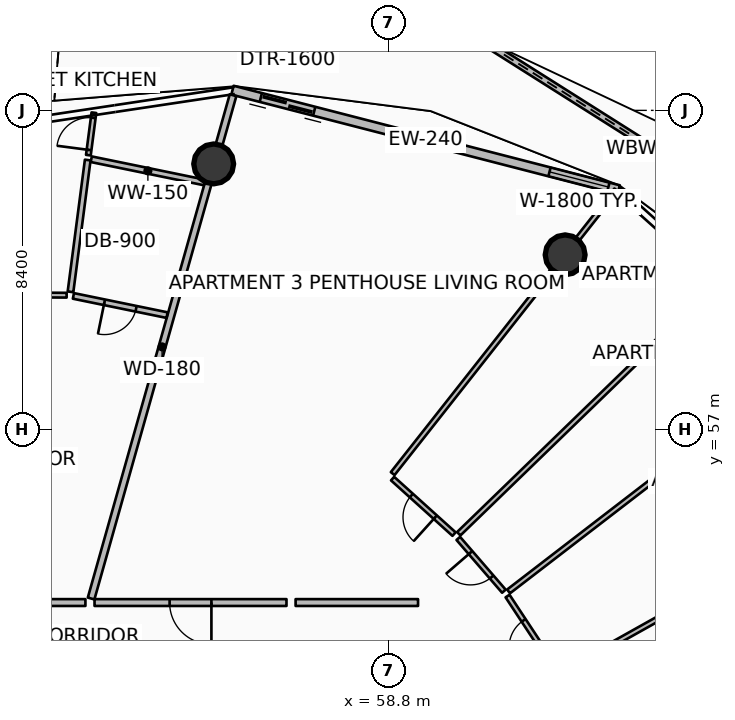
"""IFC4 building model, lengths in metres.
Left out: names, types, materials, properties, quantities, classifications, styles, units other than length and angle.
Written with IfcOpenShell. Run it as: python <this file> out.ifc"""

import sys

from ifc_helpers import new_model, si_unit, direction, frame, frame_2d, origin, origin_2d, place, context, subcontext, project, spatial, polyline, rectangle, circle, outline, extrude, element, fill, save


model = new_model("IFC4")
c1 = context("Model", 3, precision=1e-05, world=origin(), true_north=direction((0.0, 1.0)))
c2 = subcontext(c1, "Body", "Model", "MODEL_VIEW")
j1 = project(units=[si_unit("LENGTHUNIT", "METRE"), si_unit("PLANEANGLEUNIT", "RADIAN")], contexts=[c1])
p1 = place(None, origin())
s1 = spatial("IfcSite", under=j1, at=p1, CompositionType="ELEMENT")
p2 = place(p1, origin())
s2 = spatial("IfcBuilding", under=s1, at=p2, CompositionType="ELEMENT")
p3 = place(p2, frame((0.0, 0.0, 187.8)))
s3 = spatial("IfcBuildingStorey", under=s2, at=p3, CompositionType="ELEMENT", Elevation=187.8)
for number, where, z_axis, x_axis in (
    (1, (63.451, 61.599, 0.0), (0.0, 0.0, 1.0), (1.0, 0.0, 0.0)),
    (2, (54.202, 63.992, 0.0), (0.0, 0.0, 1.0), (1.0, 0.0, 0.0)),
):
    element("IfcColumn", number, at=place(p3, frame(where, z_axis=z_axis, x_axis=x_axis)), inside=s3, PredefinedType="COLUMN", context=c2, shape_type="SweptSolid", body=[
        extrude(circle(Radius=0.525, at=origin_2d()), origin(), (0.0, 0.0, 1.0), 3.5),
    ])
p4 = place(p3, frame((70.46, 61.421, 0.0), z_axis=(0.0, 0.0, 1.0), x_axis=(-0.845278126761, 0.53432657469, 0.0)))
e3 = element("IfcWall", 3, at=p4, inside=s3, PredefinedType="PARAPET", context=c2, shape_type="SweptSolid", body=[
    extrude(outline(polyline([(0.0, 0.0), (11.123, 0.0), (11.123, 1.632), (5.562, 1.418), (0.0, 1.233), (0.0, 0.0)])), frame((0.0, 0.09, 0.0), z_axis=(0.0, -1.0, 0.0), x_axis=(1.0, 0.0, 0.0)), (0.0, 0.0, 1.0), 0.18),
])
p5 = place(p3, frame((64.86, 63.313, 0.0), z_axis=(0.0, 0.0, 1.0), x_axis=(-0.968374028006, 0.249502989727, 0.0)))
e4 = element("IfcWall", 4, at=p5, inside=s3, PredefinedType="SOLIDWALL", context=c2, shape_type="SweptSolid", body=[
    extrude(rectangle(XDim=10.494, YDim=0.24, at=frame_2d((5.247, 0.0))), origin(), (0.0, 0.0, 1.0), 2.45),
])
p6 = place(p5, frame((8.274, 0.0, 0.0)))
e5 = element("IfcOpeningElement", 5, at=p6, cuts=e4, PredefinedType="OPENING", context=c2, shape_type="SweptSolid", body=[
    extrude(rectangle(XDim=1.45, YDim=2.15, at=frame_2d((0.725, 1.075))), frame((0.0, 0.13, 0.0), z_axis=(0.0, -1.0, 0.0), x_axis=(1.0, 0.0, 0.0)), (0.0, 0.0, 1.0), 0.26),
])
p7 = place(p5, frame((0.28, 0.0, 0.65)))
e6 = element("IfcOpeningElement", 6, at=p7, cuts=e4, PredefinedType="OPENING", context=c2, shape_type="SweptSolid", body=[
    extrude(rectangle(XDim=1.6, YDim=1.5, at=frame_2d((0.8, 0.75))), frame((0.0, 0.13, 0.0), z_axis=(0.0, -1.0, 0.0), x_axis=(1.0, 0.0, 0.0)), (0.0, 0.0, 1.0), 0.26),
])
p8 = place(p3, frame((50.977, 52.556, 0.0), z_axis=(0.0, 0.0, 1.0), x_axis=(0.271443307373, 0.962454430548, 0.0)))
e7 = element("IfcWall", 7, at=p8, inside=s3, PredefinedType="PARTITIONING", context=c2, shape_type="SweptSolid", body=[
    extrude(rectangle(XDim=13.759, YDim=0.18, at=frame_2d((6.88, 0.0))), origin(), (0.0, 0.0, 1.0), 2.94),
])
p9 = place(p3, frame((50.827, 52.45, 0.0), z_axis=(0.0, 0.0, 1.0), x_axis=(-1.0, 0.0, 0.0)))
e8 = element("IfcWall", 8, at=p9, inside=s3, PredefinedType="PARTITIONING", context=c2, shape_type="SweptSolid", body=[
    extrude(rectangle(XDim=3.944, YDim=0.18, at=frame_2d((1.972, 0.0))), origin(), (0.0, 0.0, 1.0), 2.94),
])
p10 = place(p3, frame((52.976, 60.012, 0.0), z_axis=(0.0, 0.0, 1.0), x_axis=(-0.979567919456, 0.201113627516, 0.0)))
e9 = element("IfcWall", 9, at=p10, inside=s3, PredefinedType="PARTITIONING", context=c2, shape_type="SweptSolid", body=[
    extrude(rectangle(XDim=2.517, YDim=0.15, at=frame_2d((1.258, 0.0))), origin(), (0.0, 0.0, 1.0), 2.94),
])
p11 = place(p10, frame((0.833, 0.0, 0.0)))
e10 = element("IfcOpeningElement", 10, at=p11, cuts=e9, PredefinedType="OPENING", context=c2, shape_type="SweptSolid", body=[
    extrude(rectangle(XDim=0.85, YDim=2.06, at=frame_2d((0.425, 1.03))), frame((0.0, 0.085, 0.0), z_axis=(0.0, -1.0, 0.0), x_axis=(1.0, 0.0, 0.0)), (0.0, 0.0, 1.0), 0.17),
])
p12 = place(p3, frame((53.961, 63.503, 0.0), z_axis=(0.0, 0.0, 1.0), x_axis=(-0.979589733131, 0.201007349976, 0.0)))
e11 = element("IfcWall", 11, at=p12, inside=s3, PredefinedType="PARTITIONING", context=c2, shape_type="SweptSolid", body=[
    extrude(rectangle(XDim=3.041, YDim=0.15, at=frame_2d((1.521, 0.0))), origin(), (0.0, 0.0, 1.0), 2.94),
])
p13 = place(p3, frame((50.435, 60.625, 0.0), z_axis=(0.0, 0.0, 1.0), x_axis=(0.129574965198, 0.991569628616, 0.0)))
e12 = element("IfcWall", 12, at=p13, inside=s3, PredefinedType="PARTITIONING", context=c2, shape_type="SweptSolid", body=[
    extrude(rectangle(XDim=3.497, YDim=0.15, at=frame_2d((1.749, 0.0))), origin(), (0.0, 0.0, 1.0), 2.94),
])
p14 = place(p3, frame((50.905, 64.222, 0.0), z_axis=(0.0, 0.0, 1.0), x_axis=(0.129607883109, 0.991565326459, 0.0)))
e13 = element("IfcWall", 13, at=p14, inside=s3, PredefinedType="PARTITIONING", context=c2, shape_type="SweptSolid", body=[
    extrude(rectangle(XDim=1.126, YDim=0.125, at=frame_2d((0.563, 0.0))), origin(), (0.0, 0.0, 1.0), 2.94),
])
p15 = place(p14, frame((0.138, 0.0, 0.0)))
e14 = element("IfcOpeningElement", 14, at=p15, cuts=e13, PredefinedType="OPENING", context=c2, shape_type="SweptSolid", body=[
    extrude(rectangle(XDim=0.85, YDim=2.06, at=frame_2d((0.425, 1.03))), frame((0.0, 0.073, 0.0), z_axis=(0.0, -1.0, 0.0), x_axis=(1.0, 0.0, 0.0)), (0.0, 0.0, 1.0), 0.145),
])
p16 = place(p3, frame((50.333, 60.537, 0.0), z_axis=(0.0, 0.0, 1.0), x_axis=(-0.999981626936, 0.006061830649, 0.0)))
e15 = element("IfcWall", 15, at=p16, inside=s3, PredefinedType="PARTITIONING", context=c2, shape_type="SweptSolid", body=[
    extrude(rectangle(XDim=4.43, YDim=0.125, at=frame_2d((2.215, 0.0))), origin(), (0.0, 0.0, 1.0), 2.94),
])
p17 = place(p16, frame((1.765, 0.0, 0.0)))
e16 = element("IfcOpeningElement", 16, at=p17, cuts=e15, PredefinedType="OPENING", context=c2, shape_type="SweptSolid", body=[
    extrude(rectangle(XDim=0.9, YDim=2.08, at=frame_2d((0.45, 1.04))), frame((0.0, 0.073, 0.0), z_axis=(0.0, -1.0, 0.0), x_axis=(1.0, 0.0, 0.0)), (0.0, 0.0, 1.0), 0.145),
])
p18 = place(p3, frame((56.118, 52.45, 0.0), z_axis=(0.0, 0.0, 1.0), x_axis=(-1.0, 0.0, 0.0)))
e17 = element("IfcWall", 17, at=p18, inside=s3, PredefinedType="PARTITIONING", context=c2, shape_type="SweptSolid", body=[
    extrude(rectangle(XDim=5.051, YDim=0.18, at=frame_2d((2.525, 0.0))), origin(), (0.0, 0.0, 1.0), 2.94),
])
p19 = place(p18, frame((1.975, 0.0, 0.0)))
e18 = element("IfcOpeningElement", 18, at=p19, cuts=e17, PredefinedType="OPENING", context=c2, shape_type="SweptSolid", body=[
    extrude(rectangle(XDim=1.1, YDim=2.1, at=frame_2d((0.55, 1.05))), frame((0.0, 0.1, 0.0), z_axis=(0.0, -1.0, 0.0), x_axis=(1.0, 0.0, 0.0)), (0.0, 0.0, 1.0), 0.2),
])
p20 = place(p3, frame((64.43, 48.356, 0.0), z_axis=(0.0, 0.0, 1.0), x_axis=(0.932640168577, 0.360807865709, 0.0)))
e19 = element("IfcWall", 19, at=p20, inside=s3, PredefinedType="PARTITIONING", context=c2, shape_type="SweptSolid", body=[
    extrude(rectangle(XDim=9.783, YDim=0.125, at=frame_2d((4.892, 0.0))), origin(), (0.0, 0.0, 1.0), 2.94),
])
p21 = place(p3, frame((59.58, 52.45, 0.0), z_axis=(0.0, 0.0, 1.0), x_axis=(-1.0, 0.0, 0.0)))
e20 = element("IfcWall", 20, at=p21, inside=s3, PredefinedType="PARTITIONING", context=c2, shape_type="SweptSolid", body=[
    extrude(rectangle(XDim=3.222, YDim=0.18, at=frame_2d((1.611, 0.0))), origin(), (0.0, 0.0, 1.0), 2.94),
])
p22 = place(p3, frame((63.379, 50.613, 0.0), z_axis=(0.0, 0.0, 1.0), x_axis=(0.872503583261, 0.488607712994, 0.0)))
e21 = element("IfcWall", 21, at=p22, inside=s3, PredefinedType="PARTITIONING", context=c2, shape_type="SweptSolid", body=[
    extrude(rectangle(XDim=10.268, YDim=0.125, at=frame_2d((5.134, 0.0))), origin(), (0.0, 0.0, 1.0), 2.94),
])
p23 = place(p3, frame((58.913, 55.843, 0.0), z_axis=(0.0, 0.0, 1.0), x_axis=(0.619083548323, 0.785325130246, 0.0)))
e22 = element("IfcWall", 22, at=p23, inside=s3, PredefinedType="PARTITIONING", context=c2, shape_type="SweptSolid", body=[
    extrude(rectangle(XDim=9.503, YDim=0.125, at=frame_2d((4.751, 0.0))), origin(), (0.0, 0.0, 1.0), 2.94),
])
p24 = place(p3, frame((61.962, 52.743, 0.0), z_axis=(0.0, 0.0, 1.0), x_axis=(0.792560870927, 0.609792805693, 0.0)))
e23 = element("IfcWall", 23, at=p24, inside=s3, PredefinedType="PARTITIONING", context=c2, shape_type="SweptSolid", body=[
    extrude(rectangle(XDim=9.922, YDim=0.125, at=frame_2d((4.961, 0.0))), origin(), (0.0, 0.0, 1.0), 2.94),
])
p25 = place(p3, frame((60.651, 54.26, 0.0), z_axis=(0.0, 0.0, 1.0), x_axis=(0.718131329051, 0.695907604669, 0.0)))
e24 = element("IfcWall", 24, at=p25, inside=s3, PredefinedType="PARTITIONING", context=c2, shape_type="SweptSolid", body=[
    extrude(rectangle(XDim=9.524, YDim=0.125, at=frame_2d((4.762, 0.0))), origin(), (0.0, 0.0, 1.0), 2.94),
])
p26 = place(p3, frame((63.248, 50.631, 0.0), z_axis=(0.0, 0.0, 1.0), x_axis=(-0.550605373428, 0.834765669366, 0.0)))
e25 = element("IfcWall", 25, at=p26, inside=s3, PredefinedType="PARTITIONING", context=c2, shape_type="SweptSolid", body=[
    extrude(rectangle(XDim=2.384, YDim=0.125, at=frame_2d((1.192, 0.0))), origin(), (0.0, 0.0, 1.0), 2.94),
])
p27 = place(p26, frame((0.767, 0.0, 0.0)))
e26 = element("IfcOpeningElement", 26, at=p27, cuts=e25, PredefinedType="OPENING", context=c2, shape_type="SweptSolid", body=[
    extrude(rectangle(XDim=0.85, YDim=2.06, at=frame_2d((0.425, 1.03))), frame((0.0, 0.073, 0.0), z_axis=(0.0, -1.0, 0.0), x_axis=(1.0, 0.0, 0.0)), (0.0, 0.0, 1.0), 0.145),
])
p28 = place(p3, frame((61.839, 52.749, 0.0), z_axis=(0.0, 0.0, 1.0), x_axis=(-0.653952359422, 0.756535730555, 0.0)))
e27 = element("IfcWall", 27, at=p28, inside=s3, PredefinedType="PARTITIONING", context=c2, shape_type="SweptSolid", body=[
    extrude(rectangle(XDim=1.835, YDim=0.125, at=frame_2d((0.917, 0.0))), origin(), (0.0, 0.0, 1.0), 2.94),
])
p29 = place(p28, frame((0.492, 0.0, 0.0)))
e28 = element("IfcOpeningElement", 28, at=p29, cuts=e27, PredefinedType="OPENING", context=c2, shape_type="SweptSolid", body=[
    extrude(rectangle(XDim=0.85, YDim=2.06, at=frame_2d((0.425, 1.03))), frame((0.0, 0.073, 0.0), z_axis=(0.0, -1.0, 0.0), x_axis=(1.0, 0.0, 0.0)), (0.0, 0.0, 1.0), 0.145),
])
p30 = place(p3, frame((60.527, 54.251, 0.0), z_axis=(0.0, 0.0, 1.0), x_axis=(-0.742223129556, 0.670152837755, 0.0)))
e29 = element("IfcWall", 29, at=p30, inside=s3, PredefinedType="PARTITIONING", context=c2, shape_type="SweptSolid", body=[
    extrude(rectangle(XDim=2.178, YDim=0.125, at=frame_2d((1.089, 0.0))), origin(), (0.0, 0.0, 1.0), 2.94),
])
p31 = place(p30, frame((0.664, 0.0, 0.0)))
e30 = element("IfcOpeningElement", 30, at=p31, cuts=e29, PredefinedType="OPENING", context=c2, shape_type="SweptSolid", body=[
    extrude(rectangle(XDim=0.85, YDim=2.06, at=frame_2d((0.425, 1.03))), frame((0.0, 0.073, 0.0), z_axis=(0.0, -1.0, 0.0), x_axis=(1.0, 0.0, 0.0)), (0.0, 0.0, 1.0), 0.145),
])
p32 = place(p6, origin())
e31 = element("IfcDoor", 31, at=p32, inside=s3, OperationType="DOUBLE_DOOR_SLIDING", PredefinedType="DOOR", context=c2, shape_type="SweptSolid", body=[
    extrude(rectangle(XDim=1.45, YDim=2.15, at=frame_2d((0.725, 1.075))), frame((0.0, 0.025, 0.0), z_axis=(0.0, -1.0, 0.0), x_axis=(1.0, 0.0, 0.0)), (0.0, 0.0, 1.0), 0.05),
])
fill(e5, e31)
p33 = place(p7, origin())
e32 = element("IfcWindow", 32, at=p33, inside=s3, PartitioningType="SINGLE_PANEL", PredefinedType="WINDOW", context=c2, shape_type="SweptSolid", body=[
    extrude(rectangle(XDim=1.6, YDim=1.5, at=frame_2d((0.8, 0.75))), frame((0.0, 0.03, 0.0), z_axis=(0.0, -1.0, 0.0), x_axis=(1.0, 0.0, 0.0)), (0.0, 0.0, 1.0), 0.06),
])
fill(e6, e32)
p34 = place(p11, origin())
e33 = element("IfcDoor", 33, at=p34, inside=s3, OperationType="SINGLE_SWING_RIGHT", PredefinedType="DOOR", context=c2, shape_type="SweptSolid", body=[
    extrude(rectangle(XDim=0.85, YDim=2.06, at=frame_2d((0.425, 1.03))), frame((0.0, 0.025, 0.0), z_axis=(0.0, -1.0, 0.0), x_axis=(1.0, 0.0, 0.0)), (0.0, 0.0, 1.0), 0.05),
])
fill(e10, e33)
p35 = place(p15, origin())
e34 = element("IfcDoor", 34, at=p35, inside=s3, OperationType="SINGLE_SWING_LEFT", PredefinedType="DOOR", context=c2, shape_type="SweptSolid", body=[
    extrude(rectangle(XDim=0.85, YDim=2.06, at=frame_2d((0.425, 1.03))), frame((0.0, 0.025, 0.0), z_axis=(0.0, -1.0, 0.0), x_axis=(1.0, 0.0, 0.0)), (0.0, 0.0, 1.0), 0.05),
])
fill(e14, e34)
p36 = place(p19, origin())
e35 = element("IfcDoor", 35, at=p36, inside=s3, OperationType="SINGLE_SWING_LEFT", PredefinedType="DOOR", context=c2, shape_type="SweptSolid", body=[
    extrude(rectangle(XDim=1.1, YDim=2.1, at=frame_2d((0.55, 1.05))), frame((0.0, 0.025, 0.0), z_axis=(0.0, -1.0, 0.0), x_axis=(1.0, 0.0, 0.0)), (0.0, 0.0, 1.0), 0.05),
])
fill(e18, e35)
p37 = place(p27, origin())
e36 = element("IfcDoor", 36, at=p37, inside=s3, OperationType="SINGLE_SWING_LEFT", PredefinedType="DOOR", context=c2, shape_type="SweptSolid", body=[
    extrude(rectangle(XDim=0.85, YDim=2.06, at=frame_2d((0.425, 1.03))), frame((0.0, 0.025, 0.0), z_axis=(0.0, -1.0, 0.0), x_axis=(1.0, 0.0, 0.0)), (0.0, 0.0, 1.0), 0.05),
])
fill(e26, e36)
p38 = place(p29, origin())
e37 = element("IfcDoor", 37, at=p38, inside=s3, OperationType="SINGLE_SWING_RIGHT", PredefinedType="DOOR", context=c2, shape_type="SweptSolid", body=[
    extrude(rectangle(XDim=0.85, YDim=2.06, at=frame_2d((0.425, 1.03))), frame((0.0, 0.025, 0.0), z_axis=(0.0, -1.0, 0.0), x_axis=(1.0, 0.0, 0.0)), (0.0, 0.0, 1.0), 0.05),
])
fill(e28, e37)
p39 = place(p31, origin())
e38 = element("IfcDoor", 38, at=p39, inside=s3, OperationType="SINGLE_SWING_LEFT", PredefinedType="DOOR", context=c2, shape_type="SweptSolid", body=[
    extrude(rectangle(XDim=0.85, YDim=2.06, at=frame_2d((0.425, 1.03))), frame((0.0, 0.025, 0.0), z_axis=(0.0, -1.0, 0.0), x_axis=(1.0, 0.0, 0.0)), (0.0, 0.0, 1.0), 0.05),
])
fill(e30, e38)
save(model, sys.argv[1])
